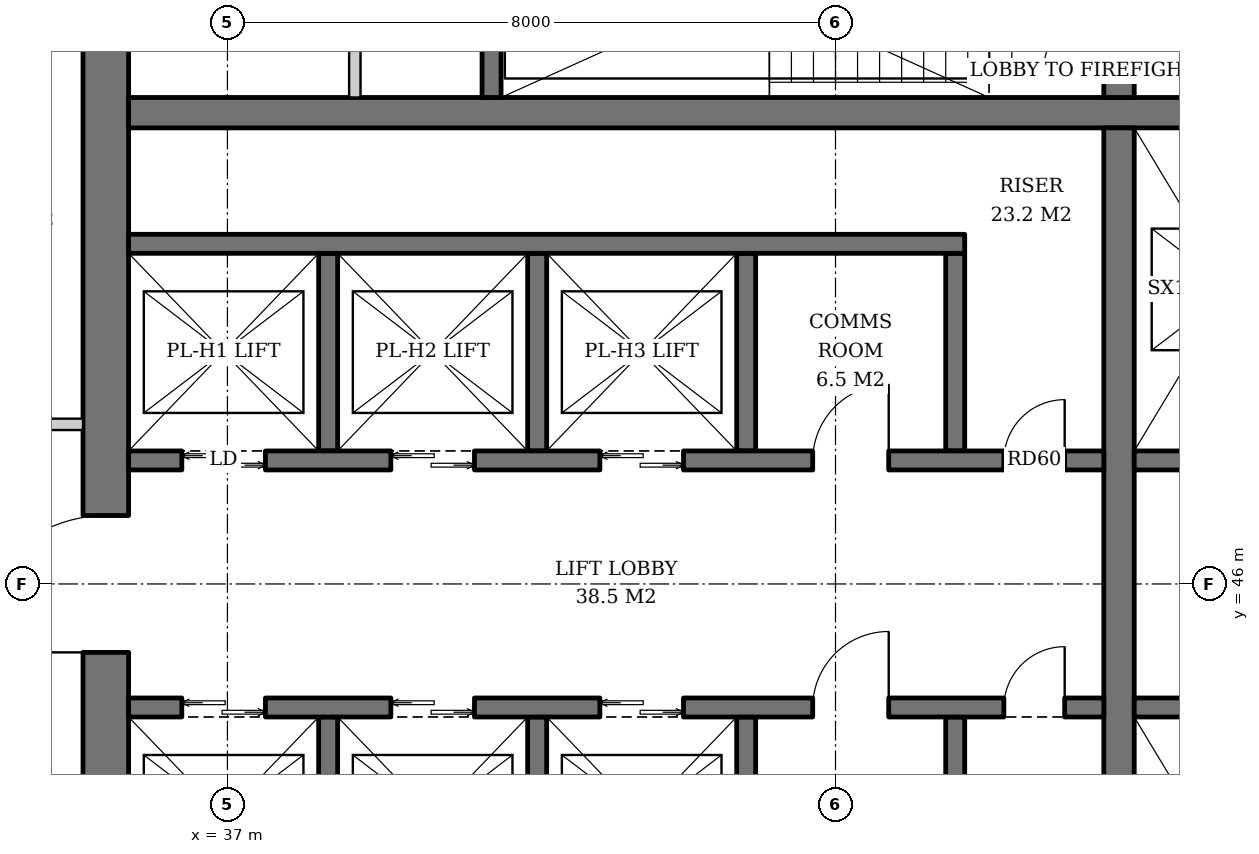
"""IFC4 building model, lengths in metres.
Left out: names, types, materials, properties, quantities, classifications, styles, units other than length and angle.
Written with IfcOpenShell. Run it as: python <this file> out.ifc"""

import sys

from ifc_helpers import new_model, si_unit, direction, frame, frame_2d, origin, place, context, subcontext, project, spatial, rectangle, extrude, element, fill, save


model = new_model("IFC4")
c1 = context("Model", 3, precision=1e-05, world=origin(), true_north=direction((0.0, 1.0)))
c2 = subcontext(c1, "Body", "Model", "MODEL_VIEW")
j1 = project(units=[si_unit("LENGTHUNIT", "METRE"), si_unit("PLANEANGLEUNIT", "RADIAN")], contexts=[c1])
p1 = place(None, origin())
s1 = spatial("IfcSite", under=j1, at=p1, CompositionType="ELEMENT")
p2 = place(p1, origin())
s2 = spatial("IfcBuilding", under=s1, at=p2, CompositionType="ELEMENT")
p3 = place(p2, frame((0.0, 0.0, 222.4)))
s3 = spatial("IfcBuildingStorey", under=s2, at=p3, CompositionType="ELEMENT", Elevation=222.4)
p4 = place(p3, frame((35.4, 36.7, 0.0), z_axis=(0.0, 0.0, 1.0), x_axis=(0.0, 1.0, 0.0)))
e1 = element("IfcWall", 1, at=p4, inside=s3, PredefinedType="SHEAR", context=c2, shape_type="SweptSolid", body=[
    extrude(rectangle(XDim=18.6, YDim=0.6, at=frame_2d((9.3, 0.0))), origin(), (0.0, 0.0, 1.0), 3.8),
])
p5 = place(p4, frame((8.4, 0.0, 0.0)))
e2 = element("IfcOpeningElement", 2, at=p5, cuts=e1, PredefinedType="OPENING", context=c2, shape_type="SweptSolid", body=[
    extrude(rectangle(XDim=1.8, YDim=2.4, at=frame_2d((0.9, 1.2))), frame((0.0, 0.31, 0.0), z_axis=(0.0, -1.0, 0.0), x_axis=(1.0, 0.0, 0.0)), (0.0, 0.0, 1.0), 0.62),
])
p6 = place(p3, frame((35.7, 52.2, 0.0), z_axis=(0.0, 0.0, 1.0), x_axis=(1.0, 0.0, 0.0)))
e3 = element("IfcWall", 3, at=p6, inside=s3, PredefinedType="SHEAR", context=c2, shape_type="SweptSolid", body=[
    extrude(rectangle(XDim=18.6, YDim=0.4, at=frame_2d((9.3, 0.0))), origin(), (0.0, 0.0, 1.0), 3.8),
])
p7 = place(p3, frame((48.73, 40.0, 0.0), z_axis=(0.0, 0.0, 1.0), x_axis=(0.0, 1.0, 0.0)))
e4 = element("IfcWall", 4, at=p7, inside=s3, PredefinedType="SHEAR", context=c2, shape_type="SweptSolid", body=[
    extrude(rectangle(XDim=12.0, YDim=0.4, at=frame_2d((6.0, 0.0))), origin(), (0.0, 0.0, 1.0), 3.8),
])
p8 = place(p3, frame((48.73, 52.4, 0.0), z_axis=(0.0, 0.0, 1.0), x_axis=(0.0, 1.0, 0.0)))
e5 = element("IfcWall", 5, at=p8, inside=s3, PredefinedType="SHEAR", context=c2, shape_type="SweptSolid", body=[
    extrude(rectangle(XDim=2.9, YDim=0.4, at=frame_2d((1.45, 0.0))), origin(), (0.0, 0.0, 1.0), 3.8),
])
p9 = place(p8, frame((0.3, 0.0, 0.0)))
e6 = element("IfcOpeningElement", 6, at=p9, cuts=e5, PredefinedType="OPENING", context=c2, shape_type="SweptSolid", body=[
    extrude(rectangle(XDim=1.0, YDim=2.1, at=frame_2d((0.5, 1.05))), frame((0.0, 0.21, 0.0), z_axis=(0.0, -1.0, 0.0), x_axis=(1.0, 0.0, 0.0)), (0.0, 0.0, 1.0), 0.42),
])
p10 = place(p3, frame((40.475, 52.4, 0.0), z_axis=(0.0, 0.0, 1.0), x_axis=(0.0, 1.0, 0.0)))
e7 = element("IfcWall", 7, at=p10, inside=s3, PredefinedType="SHEAR", context=c2, shape_type="SweptSolid", body=[
    extrude(rectangle(XDim=2.9, YDim=0.25, at=frame_2d((1.45, 0.0))), origin(), (0.0, 0.0, 1.0), 3.8),
])
for number, where, z_axis, x_axis in (
    (8, (38.325, 47.75, 0.0), (0.0, 0.0, 1.0), (0.0, 1.0, 0.0)),
    (9, (41.075, 47.75, 0.0), (0.0, 0.0, 1.0), (0.0, 1.0, 0.0)),
    (10, (43.825, 47.75, 0.0), (0.0, 0.0, 1.0), (0.0, 1.0, 0.0)),
    (11, (46.575, 47.75, 0.0), (0.0, 0.0, 1.0), (0.0, 1.0, 0.0)),
):
    element("IfcWall", number, at=place(p3, frame(where, z_axis=z_axis, x_axis=x_axis)), inside=s3, PredefinedType="SHEAR", context=c2, shape_type="SweptSolid", body=[
        extrude(rectangle(XDim=2.6, YDim=0.25, at=frame_2d((1.3, 0.0))), origin(), (0.0, 0.0, 1.0), 3.8),
    ])
p11 = place(p3, frame((35.7, 50.475, 0.0), z_axis=(0.0, 0.0, 1.0), x_axis=(1.0, 0.0, 0.0)))
e12 = element("IfcWall", 12, at=p11, inside=s3, PredefinedType="SHEAR", context=c2, shape_type="SweptSolid", body=[
    extrude(rectangle(XDim=11.0, YDim=0.25, at=frame_2d((5.5, 0.0))), origin(), (0.0, 0.0, 1.0), 3.8),
])
p12 = place(p3, frame((35.7, 47.625, 0.0), z_axis=(0.0, 0.0, 1.0), x_axis=(1.0, 0.0, 0.0)))
e13 = element("IfcWall", 13, at=p12, inside=s3, PredefinedType="SHEAR", context=c2, shape_type="SweptSolid", body=[
    extrude(rectangle(XDim=12.83, YDim=0.25, at=frame_2d((6.415, 0.0))), origin(), (0.0, 0.0, 1.0), 3.8),
])
p13 = place(p12, frame((0.7, 0.0, 0.0)))
e14 = element("IfcOpeningElement", 14, at=p13, cuts=e13, PredefinedType="OPENING", context=c2, shape_type="SweptSolid", body=[
    extrude(rectangle(XDim=1.1, YDim=2.2, at=frame_2d((0.55, 1.1))), frame((0.0, 0.135, 0.0), z_axis=(0.0, -1.0, 0.0), x_axis=(1.0, 0.0, 0.0)), (0.0, 0.0, 1.0), 0.27),
])
p14 = place(p12, frame((3.45, 0.0, 0.0)))
e15 = element("IfcOpeningElement", 15, at=p14, cuts=e13, PredefinedType="OPENING", context=c2, shape_type="SweptSolid", body=[
    extrude(rectangle(XDim=1.1, YDim=2.2, at=frame_2d((0.55, 1.1))), frame((0.0, 0.135, 0.0), z_axis=(0.0, -1.0, 0.0), x_axis=(1.0, 0.0, 0.0)), (0.0, 0.0, 1.0), 0.27),
])
p15 = place(p12, frame((6.2, 0.0, 0.0)))
e16 = element("IfcOpeningElement", 16, at=p15, cuts=e13, PredefinedType="OPENING", context=c2, shape_type="SweptSolid", body=[
    extrude(rectangle(XDim=1.1, YDim=2.2, at=frame_2d((0.55, 1.1))), frame((0.0, 0.135, 0.0), z_axis=(0.0, -1.0, 0.0), x_axis=(1.0, 0.0, 0.0)), (0.0, 0.0, 1.0), 0.27),
])
p16 = place(p12, frame((9.0, 0.0, 0.0)))
e17 = element("IfcOpeningElement", 17, at=p16, cuts=e13, PredefinedType="OPENING", context=c2, shape_type="SweptSolid", body=[
    extrude(rectangle(XDim=1.0, YDim=2.1, at=frame_2d((0.5, 1.05))), frame((0.0, 0.135, 0.0), z_axis=(0.0, -1.0, 0.0), x_axis=(1.0, 0.0, 0.0)), (0.0, 0.0, 1.0), 0.27),
])
p17 = place(p12, frame((11.515, 0.0, 0.0)))
e18 = element("IfcOpeningElement", 18, at=p17, cuts=e13, PredefinedType="OPENING", context=c2, shape_type="SweptSolid", body=[
    extrude(rectangle(XDim=0.8, YDim=2.0, at=frame_2d((0.4, 1.0))), frame((0.0, 0.135, 0.0), z_axis=(0.0, -1.0, 0.0), x_axis=(1.0, 0.0, 0.0)), (0.0, 0.0, 1.0), 0.27),
])
for number, where, z_axis, x_axis in (
    (19, (38.325, 44.25, 0.0), (0.0, 0.0, 1.0), (0.0, -1.0, 0.0)),
    (20, (41.075, 44.25, 0.0), (0.0, 0.0, 1.0), (0.0, -1.0, 0.0)),
    (21, (43.825, 44.25, 0.0), (0.0, 0.0, 1.0), (0.0, -1.0, 0.0)),
    (22, (46.575, 44.25, 0.0), (0.0, 0.0, 1.0), (0.0, -1.0, 0.0)),
):
    element("IfcWall", number, at=place(p3, frame(where, z_axis=z_axis, x_axis=x_axis)), inside=s3, PredefinedType="SHEAR", context=c2, shape_type="SweptSolid", body=[
        extrude(rectangle(XDim=2.6, YDim=0.25, at=frame_2d((1.3, 0.0))), origin(), (0.0, 0.0, 1.0), 3.8),
    ])
p18 = place(p3, frame((35.7, 44.375, 0.0), z_axis=(0.0, 0.0, 1.0), x_axis=(1.0, 0.0, 0.0)))
e23 = element("IfcWall", 23, at=p18, inside=s3, PredefinedType="SHEAR", context=c2, shape_type="SweptSolid", body=[
    extrude(rectangle(XDim=12.83, YDim=0.25, at=frame_2d((6.415, 0.0))), origin(), (0.0, 0.0, 1.0), 3.8),
])
p19 = place(p18, frame((0.7, 0.0, 0.0)))
e24 = element("IfcOpeningElement", 24, at=p19, cuts=e23, PredefinedType="OPENING", context=c2, shape_type="SweptSolid", body=[
    extrude(rectangle(XDim=1.1, YDim=2.2, at=frame_2d((0.55, 1.1))), frame((0.0, 0.135, 0.0), z_axis=(0.0, -1.0, 0.0), x_axis=(1.0, 0.0, 0.0)), (0.0, 0.0, 1.0), 0.27),
])
p20 = place(p18, frame((3.45, 0.0, 0.0)))
e25 = element("IfcOpeningElement", 25, at=p20, cuts=e23, PredefinedType="OPENING", context=c2, shape_type="SweptSolid", body=[
    extrude(rectangle(XDim=1.1, YDim=2.2, at=frame_2d((0.55, 1.1))), frame((0.0, 0.135, 0.0), z_axis=(0.0, -1.0, 0.0), x_axis=(1.0, 0.0, 0.0)), (0.0, 0.0, 1.0), 0.27),
])
p21 = place(p18, frame((6.2, 0.0, 0.0)))
e26 = element("IfcOpeningElement", 26, at=p21, cuts=e23, PredefinedType="OPENING", context=c2, shape_type="SweptSolid", body=[
    extrude(rectangle(XDim=1.1, YDim=2.2, at=frame_2d((0.55, 1.1))), frame((0.0, 0.135, 0.0), z_axis=(0.0, -1.0, 0.0), x_axis=(1.0, 0.0, 0.0)), (0.0, 0.0, 1.0), 0.27),
])
p22 = place(p18, frame((9.0, 0.0, 0.0)))
e27 = element("IfcOpeningElement", 27, at=p22, cuts=e23, PredefinedType="OPENING", context=c2, shape_type="SweptSolid", body=[
    extrude(rectangle(XDim=1.0, YDim=2.1, at=frame_2d((0.5, 1.05))), frame((0.0, 0.135, 0.0), z_axis=(0.0, -1.0, 0.0), x_axis=(1.0, 0.0, 0.0)), (0.0, 0.0, 1.0), 0.27),
])
p23 = place(p18, frame((11.515, 0.0, 0.0)))
e28 = element("IfcOpeningElement", 28, at=p23, cuts=e23, PredefinedType="OPENING", context=c2, shape_type="SweptSolid", body=[
    extrude(rectangle(XDim=0.8, YDim=2.0, at=frame_2d((0.4, 1.0))), frame((0.0, 0.135, 0.0), z_axis=(0.0, -1.0, 0.0), x_axis=(1.0, 0.0, 0.0)), (0.0, 0.0, 1.0), 0.27),
])
for number, where, z_axis, x_axis in (
    (29, (48.93, 47.625, 0.0), (0.0, 0.0, 1.0), (1.0, 0.0, 0.0)),
    (30, (48.93, 44.375, 0.0), (0.0, 0.0, 1.0), (1.0, 0.0, 0.0)),
):
    element("IfcWall", number, at=place(p3, frame(where, z_axis=z_axis, x_axis=x_axis)), inside=s3, PredefinedType="SHEAR", context=c2, shape_type="SweptSolid", body=[
        extrude(rectangle(XDim=5.37, YDim=0.25, at=frame_2d((2.685, 0.0))), origin(), (0.0, 0.0, 1.0), 3.8),
    ])
p24 = place(p3, frame((38.676, 52.4, 0.0), z_axis=(0.0, 0.0, 1.0), x_axis=(0.0, 1.0, 0.0)))
e31 = element("IfcWall", 31, at=p24, inside=s3, PredefinedType="SOLIDWALL", context=c2, shape_type="SweptSolid", body=[
    extrude(rectangle(XDim=2.9, YDim=0.15, at=frame_2d((1.45, 0.0))), origin(), (0.0, 0.0, 1.0), 3.52),
])
p25 = place(p3, frame((35.1, 48.1, 0.0), z_axis=(0.0, 0.0, 1.0), x_axis=(-1.0, 0.0, 0.0)))
e32 = element("IfcWall", 32, at=p25, inside=s3, PredefinedType="PARTITIONING", context=c2, shape_type="SweptSolid", body=[
    extrude(rectangle(XDim=1.725, YDim=0.15, at=frame_2d((0.863, 0.0))), origin(), (0.0, 0.0, 1.0), 3.52),
])
p26 = place(p13, origin())
e33 = element("IfcDoor", 33, at=p26, inside=s3, OperationType="DOUBLE_DOOR_SLIDING", PredefinedType="DOOR", context=c2, shape_type="SweptSolid", body=[
    extrude(rectangle(XDim=1.1, YDim=2.2, at=frame_2d((0.55, 1.1))), frame((0.0, 0.025, 0.0), z_axis=(0.0, -1.0, 0.0), x_axis=(1.0, 0.0, 0.0)), (0.0, 0.0, 1.0), 0.05),
])
fill(e14, e33)
p27 = place(p14, origin())
e34 = element("IfcDoor", 34, at=p27, inside=s3, OperationType="DOUBLE_DOOR_SLIDING", PredefinedType="DOOR", context=c2, shape_type="SweptSolid", body=[
    extrude(rectangle(XDim=1.1, YDim=2.2, at=frame_2d((0.55, 1.1))), frame((0.0, 0.025, 0.0), z_axis=(0.0, -1.0, 0.0), x_axis=(1.0, 0.0, 0.0)), (0.0, 0.0, 1.0), 0.05),
])
fill(e15, e34)
p28 = place(p15, origin())
e35 = element("IfcDoor", 35, at=p28, inside=s3, OperationType="DOUBLE_DOOR_SLIDING", PredefinedType="DOOR", context=c2, shape_type="SweptSolid", body=[
    extrude(rectangle(XDim=1.1, YDim=2.2, at=frame_2d((0.55, 1.1))), frame((0.0, 0.025, 0.0), z_axis=(0.0, -1.0, 0.0), x_axis=(1.0, 0.0, 0.0)), (0.0, 0.0, 1.0), 0.05),
])
fill(e16, e35)
p29 = place(p16, origin())
e36 = element("IfcDoor", 36, at=p29, inside=s3, OperationType="SINGLE_SWING_RIGHT", PredefinedType="DOOR", context=c2, shape_type="SweptSolid", body=[
    extrude(rectangle(XDim=1.0, YDim=2.1, at=frame_2d((0.5, 1.05))), frame((0.0, 0.025, 0.0), z_axis=(0.0, -1.0, 0.0), x_axis=(1.0, 0.0, 0.0)), (0.0, 0.0, 1.0), 0.05),
])
fill(e17, e36)
p30 = place(p17, origin())
e37 = element("IfcDoor", 37, at=p30, inside=s3, OperationType="SINGLE_SWING_RIGHT", PredefinedType="DOOR", context=c2, shape_type="SweptSolid", body=[
    extrude(rectangle(XDim=0.8, YDim=2.0, at=frame_2d((0.4, 1.0))), frame((0.0, 0.025, 0.0), z_axis=(0.0, -1.0, 0.0), x_axis=(1.0, 0.0, 0.0)), (0.0, 0.0, 1.0), 0.05),
])
fill(e18, e37)
p31 = place(p19, origin())
e38 = element("IfcDoor", 38, at=p31, inside=s3, OperationType="DOUBLE_DOOR_SLIDING", PredefinedType="DOOR", context=c2, shape_type="SweptSolid", body=[
    extrude(rectangle(XDim=1.1, YDim=2.2, at=frame_2d((0.55, 1.1))), frame((0.0, 0.025, 0.0), z_axis=(0.0, -1.0, 0.0), x_axis=(1.0, 0.0, 0.0)), (0.0, 0.0, 1.0), 0.05),
])
fill(e24, e38)
p32 = place(p20, origin())
e39 = element("IfcDoor", 39, at=p32, inside=s3, OperationType="DOUBLE_DOOR_SLIDING", PredefinedType="DOOR", context=c2, shape_type="SweptSolid", body=[
    extrude(rectangle(XDim=1.1, YDim=2.2, at=frame_2d((0.55, 1.1))), frame((0.0, 0.025, 0.0), z_axis=(0.0, -1.0, 0.0), x_axis=(1.0, 0.0, 0.0)), (0.0, 0.0, 1.0), 0.05),
])
fill(e25, e39)
p33 = place(p21, origin())
e40 = element("IfcDoor", 40, at=p33, inside=s3, OperationType="DOUBLE_DOOR_SLIDING", PredefinedType="DOOR", context=c2, shape_type="SweptSolid", body=[
    extrude(rectangle(XDim=1.1, YDim=2.2, at=frame_2d((0.55, 1.1))), frame((0.0, 0.025, 0.0), z_axis=(0.0, -1.0, 0.0), x_axis=(1.0, 0.0, 0.0)), (0.0, 0.0, 1.0), 0.05),
])
fill(e26, e40)
p34 = place(p22, origin())
e41 = element("IfcDoor", 41, at=p34, inside=s3, OperationType="SINGLE_SWING_RIGHT", PredefinedType="DOOR", context=c2, shape_type="SweptSolid", body=[
    extrude(rectangle(XDim=1.0, YDim=2.1, at=frame_2d((0.5, 1.05))), frame((0.0, 0.025, 0.0), z_axis=(0.0, -1.0, 0.0), x_axis=(1.0, 0.0, 0.0)), (0.0, 0.0, 1.0), 0.05),
])
fill(e27, e41)
p35 = place(p23, origin())
e42 = element("IfcDoor", 42, at=p35, inside=s3, OperationType="SINGLE_SWING_RIGHT", PredefinedType="DOOR", context=c2, shape_type="SweptSolid", body=[
    extrude(rectangle(XDim=0.8, YDim=2.0, at=frame_2d((0.4, 1.0))), frame((0.0, 0.025, 0.0), z_axis=(0.0, -1.0, 0.0), x_axis=(1.0, 0.0, 0.0)), (0.0, 0.0, 1.0), 0.05),
])
fill(e28, e42)
p36 = place(p9, origin())
e43 = element("IfcDoor", 43, at=p36, inside=s3, OperationType="SINGLE_SWING_LEFT", PredefinedType="DOOR", context=c2, shape_type="SweptSolid", body=[
    extrude(rectangle(XDim=1.0, YDim=2.1, at=frame_2d((0.5, 1.05))), frame((0.0, 0.025, 0.0), z_axis=(0.0, -1.0, 0.0), x_axis=(1.0, 0.0, 0.0)), (0.0, 0.0, 1.0), 0.05),
])
fill(e6, e43)
p37 = place(p5, origin())
e44 = element("IfcDoor", 44, at=p37, inside=s3, OperationType="DOUBLE_DOOR_SINGLE_SWING", PredefinedType="DOOR", context=c2, shape_type="SweptSolid", body=[
    extrude(rectangle(XDim=1.8, YDim=2.4, at=frame_2d((0.9, 1.2))), frame((0.0, 0.025, 0.0), z_axis=(0.0, -1.0, 0.0), x_axis=(1.0, 0.0, 0.0)), (0.0, 0.0, 1.0), 0.05),
])
fill(e2, e44)
save(model, sys.argv[1])
